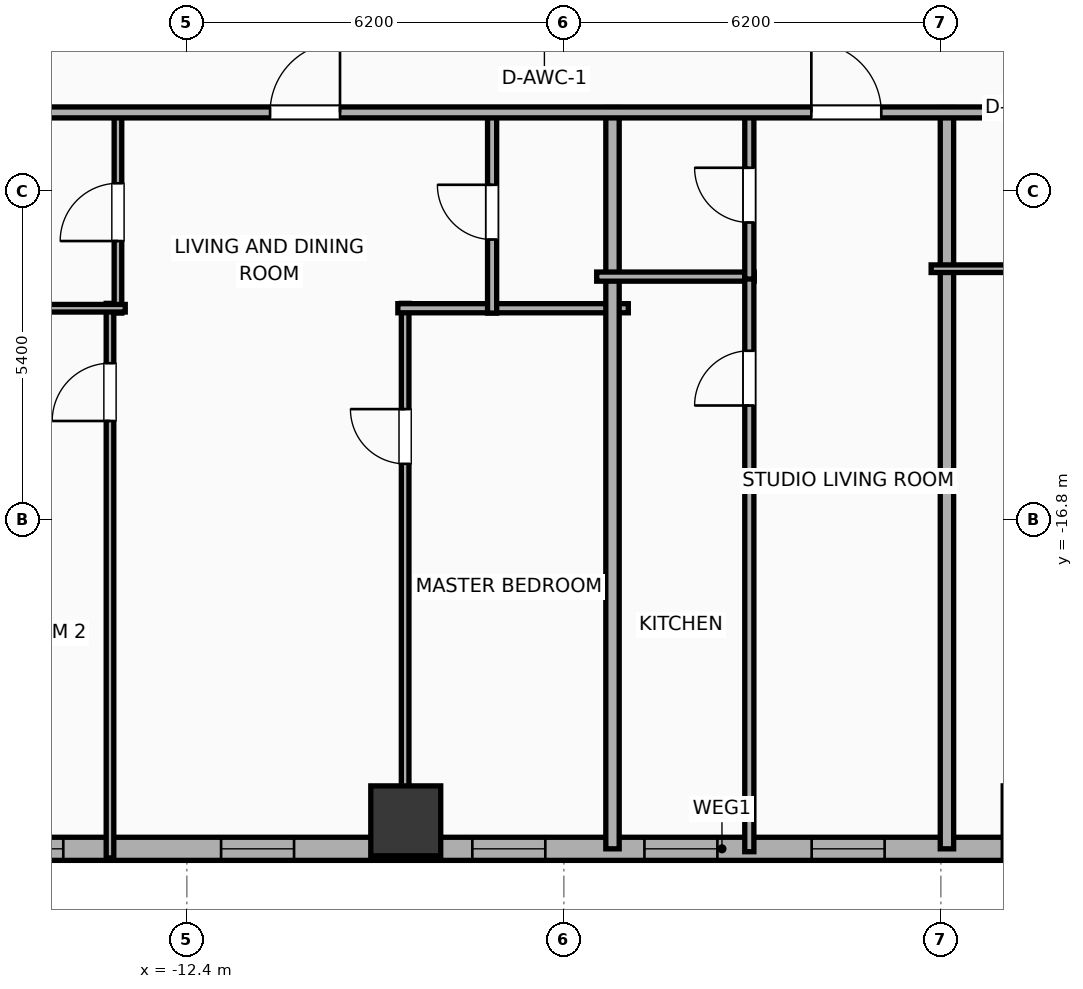
"""IFC4 building model, lengths in metres.
Left out: names, types, materials, properties, quantities, classifications, styles, units other than length and angle.
Written with IfcOpenShell. Run it as: python <this file> out.ifc"""

import sys

from ifc_helpers import new_model, si_unit, direction, frame, frame_2d, origin, origin_2d, place, context, subcontext, project, spatial, rectangle, hollow_rectangle, extrude, element, fill, save


model = new_model("IFC4")
c1 = context("Model", 3, precision=1e-05, world=origin(), true_north=direction((0.0, 1.0)))
c2 = subcontext(c1, "Body", "Model", "MODEL_VIEW")
j1 = project(units=[si_unit("LENGTHUNIT", "METRE"), si_unit("PLANEANGLEUNIT", "RADIAN")], contexts=[c1])
p1 = place(None, origin())
s1 = spatial("IfcSite", under=j1, at=p1, CompositionType="ELEMENT")
p2 = place(p1, origin())
s2 = spatial("IfcBuilding", under=s1, at=p2, CompositionType="ELEMENT")
p3 = place(p2, frame((0.0, 0.0, 45.5)))
s3 = spatial("IfcBuildingStorey", under=s2, at=p3, CompositionType="ELEMENT", Elevation=45.5)
for number, where, z_axis, x_axis in (
    (1, (-8.8, -21.75, 0.0), (0.0, 0.0, 1.0), (1.0, 0.0, 0.0)),
    (2, (1.6, -21.75, 0.0), (0.0, 0.0, 1.0), (1.0, 0.0, 0.0)),
):
    element("IfcColumn", number, at=place(p3, frame(where, z_axis=z_axis, x_axis=x_axis)), inside=s3, PredefinedType="COLUMN", context=c2, shape_type="SweptSolid", body=[
        extrude(hollow_rectangle(XDim=1.15, YDim=1.15, WallThickness=0.04, at=origin_2d()), origin(), (0.0, 0.0, 1.0), 3.9),
    ])
p4 = place(p3, frame((22.381, -22.21, 0.0), z_axis=(0.0, 0.0, 1.0), x_axis=(-1.0, 0.0, 0.0)))
e3 = element("IfcWall", 3, at=p4, inside=s3, PredefinedType="ELEMENTEDWALL", context=c2, shape_type="SweptSolid", body=[
    extrude(rectangle(XDim=51.963, YDim=0.38, at=frame_2d((25.981, 0.0))), origin(), (0.0, 0.0, 1.0), 3.65),
])
p5 = place(p4, frame((42.952, 0.0, 0.75)))
e4 = element("IfcOpeningElement", 4, at=p5, cuts=e3, PredefinedType="OPENING", context=c2, shape_type="SweptSolid", body=[
    extrude(rectangle(XDim=2.4, YDim=2.1, at=frame_2d((1.2, 1.05))), frame((0.0, 0.2, 0.0), z_axis=(0.0, -1.0, 0.0), x_axis=(1.0, 0.0, 0.0)), (0.0, 0.0, 1.0), 0.4),
])
p6 = place(p4, frame((49.847, 0.0, 0.75)))
e5 = element("IfcOpeningElement", 5, at=p6, cuts=e3, PredefinedType="OPENING", context=c2, shape_type="SweptSolid", body=[
    extrude(rectangle(XDim=1.2, YDim=2.05, at=frame_2d((0.6, 1.025))), frame((0.0, 0.2, 0.0), z_axis=(0.0, -1.0, 0.0), x_axis=(1.0, 0.0, 0.0)), (0.0, 0.0, 1.0), 0.4),
])
p7 = place(p4, frame((47.445, 0.0, 0.75)))
e6 = element("IfcOpeningElement", 6, at=p7, cuts=e3, PredefinedType="OPENING", context=c2, shape_type="SweptSolid", body=[
    extrude(rectangle(XDim=1.2, YDim=2.05, at=frame_2d((0.6, 1.025))), frame((0.0, 0.2, 0.0), z_axis=(0.0, -1.0, 0.0), x_axis=(1.0, 0.0, 0.0)), (0.0, 0.0, 1.0), 0.4),
])
p8 = place(p4, frame((39.526, 0.0, 0.75)))
e7 = element("IfcOpeningElement", 7, at=p8, cuts=e3, PredefinedType="OPENING", context=c2, shape_type="SweptSolid", body=[
    extrude(rectangle(XDim=1.2, YDim=2.05, at=frame_2d((0.6, 1.025))), frame((0.0, 0.2, 0.0), z_axis=(0.0, -1.0, 0.0), x_axis=(1.0, 0.0, 0.0)), (0.0, 0.0, 1.0), 0.4),
])
p9 = place(p4, frame((33.018, 0.0, 0.75)))
e8 = element("IfcOpeningElement", 8, at=p9, cuts=e3, PredefinedType="OPENING", context=c2, shape_type="SweptSolid", body=[
    extrude(rectangle(XDim=1.2, YDim=2.05, at=frame_2d((0.6, 1.025))), frame((0.0, 0.2, 0.0), z_axis=(0.0, -1.0, 0.0), x_axis=(1.0, 0.0, 0.0)), (0.0, 0.0, 1.0), 0.4),
])
p10 = place(p4, frame((36.813, 0.0, 0.75)))
e9 = element("IfcOpeningElement", 9, at=p10, cuts=e3, PredefinedType="OPENING", context=c2, shape_type="SweptSolid", body=[
    extrude(rectangle(XDim=1.2, YDim=2.05, at=frame_2d((0.6, 1.025))), frame((0.0, 0.2, 0.0), z_axis=(0.0, -1.0, 0.0), x_axis=(1.0, 0.0, 0.0)), (0.0, 0.0, 1.0), 0.4),
])
p11 = place(p4, frame((28.886, 0.0, 0.75)))
e10 = element("IfcOpeningElement", 10, at=p11, cuts=e3, PredefinedType="OPENING", context=c2, shape_type="SweptSolid", body=[
    extrude(rectangle(XDim=1.2, YDim=2.05, at=frame_2d((0.6, 1.025))), frame((0.0, 0.2, 0.0), z_axis=(0.0, -1.0, 0.0), x_axis=(1.0, 0.0, 0.0)), (0.0, 0.0, 1.0), 0.4),
])
p12 = place(p4, frame((23.306, 0.0, 0.75)))
e11 = element("IfcOpeningElement", 11, at=p12, cuts=e3, PredefinedType="OPENING", context=c2, shape_type="SweptSolid", body=[
    extrude(rectangle(XDim=1.2, YDim=2.05, at=frame_2d((0.6, 1.025))), frame((0.0, 0.2, 0.0), z_axis=(0.0, -1.0, 0.0), x_axis=(1.0, 0.0, 0.0)), (0.0, 0.0, 1.0), 0.4),
])
p13 = place(p4, frame((26.056, 0.0, 0.75)))
e12 = element("IfcOpeningElement", 12, at=p13, cuts=e3, PredefinedType="OPENING", context=c2, shape_type="SweptSolid", body=[
    extrude(rectangle(XDim=1.2, YDim=2.05, at=frame_2d((0.6, 1.025))), frame((0.0, 0.2, 0.0), z_axis=(0.0, -1.0, 0.0), x_axis=(1.0, 0.0, 0.0)), (0.0, 0.0, 1.0), 0.4),
])
p14 = place(p4, frame((18.811, 0.0, 0.75)))
e13 = element("IfcOpeningElement", 13, at=p14, cuts=e3, PredefinedType="OPENING", context=c2, shape_type="SweptSolid", body=[
    extrude(rectangle(XDim=1.2, YDim=2.05, at=frame_2d((0.6, 1.025))), frame((0.0, 0.2, 0.0), z_axis=(0.0, -1.0, 0.0), x_axis=(1.0, 0.0, 0.0)), (0.0, 0.0, 1.0), 0.4),
])
p15 = place(p4, frame((14.602, 0.0, 0.75)))
e14 = element("IfcOpeningElement", 14, at=p15, cuts=e3, PredefinedType="OPENING", context=c2, shape_type="SweptSolid", body=[
    extrude(rectangle(XDim=1.2, YDim=2.05, at=frame_2d((0.6, 1.025))), frame((0.0, 0.2, 0.0), z_axis=(0.0, -1.0, 0.0), x_axis=(1.0, 0.0, 0.0)), (0.0, 0.0, 1.0), 0.4),
])
p16 = place(p4, frame((11.852, 0.0, 0.75)))
e15 = element("IfcOpeningElement", 15, at=p16, cuts=e3, PredefinedType="OPENING", context=c2, shape_type="SweptSolid", body=[
    extrude(rectangle(XDim=1.2, YDim=2.05, at=frame_2d((0.6, 1.025))), frame((0.0, 0.2, 0.0), z_axis=(0.0, -1.0, 0.0), x_axis=(1.0, 0.0, 0.0)), (0.0, 0.0, 1.0), 0.4),
])
p17 = place(p4, frame((8.316, 0.0, 0.75)))
e16 = element("IfcOpeningElement", 16, at=p17, cuts=e3, PredefinedType="OPENING", context=c2, shape_type="SweptSolid", body=[
    extrude(rectangle(XDim=1.2, YDim=2.05, at=frame_2d((0.6, 1.025))), frame((0.0, 0.2, 0.0), z_axis=(0.0, -1.0, 0.0), x_axis=(1.0, 0.0, 0.0)), (0.0, 0.0, 1.0), 0.4),
])
p18 = place(p4, frame((6.286, 0.0, 0.75)))
e17 = element("IfcOpeningElement", 17, at=p18, cuts=e3, PredefinedType="OPENING", context=c2, shape_type="SweptSolid", body=[
    extrude(rectangle(XDim=1.2, YDim=2.05, at=frame_2d((0.6, 1.025))), frame((0.0, 0.2, 0.0), z_axis=(0.0, -1.0, 0.0), x_axis=(1.0, 0.0, 0.0)), (0.0, 0.0, 1.0), 0.4),
])
p19 = place(p4, frame((3.737, 0.0, 0.75)))
e18 = element("IfcOpeningElement", 18, at=p19, cuts=e3, PredefinedType="OPENING", context=c2, shape_type="SweptSolid", body=[
    extrude(rectangle(XDim=1.2, YDim=2.05, at=frame_2d((0.6, 1.025))), frame((0.0, 0.2, 0.0), z_axis=(0.0, -1.0, 0.0), x_axis=(1.0, 0.0, 0.0)), (0.0, 0.0, 1.0), 0.4),
])
p20 = place(p4, frame((1.291, 0.0, 0.75)))
e19 = element("IfcOpeningElement", 19, at=p20, cuts=e3, PredefinedType="OPENING", context=c2, shape_type="SweptSolid", body=[
    extrude(rectangle(XDim=1.2, YDim=2.05, at=frame_2d((0.6, 1.025))), frame((0.0, 0.2, 0.0), z_axis=(0.0, -1.0, 0.0), x_axis=(1.0, 0.0, 0.0)), (0.0, 0.0, 1.0), 0.4),
])
p21 = place(p3, frame((-13.664, -22.36, 0.0), z_axis=(0.0, 0.0, 1.0), x_axis=(0.0, 1.0, 0.0)))
e20 = element("IfcWall", 20, at=p21, inside=s3, PredefinedType="PARTITIONING", context=c2, shape_type="SweptSolid", body=[
    extrude(rectangle(XDim=9.12, YDim=0.125, at=frame_2d((4.56, 0.0))), origin(), (0.0, 0.0, 1.0), 3.65),
])
p22 = place(p21, frame((7.186, 0.0, 0.0)))
e21 = element("IfcOpeningElement", 21, at=p22, cuts=e20, PredefinedType="OPENING", context=c2, shape_type="SweptSolid", body=[
    extrude(rectangle(XDim=0.95, YDim=2.05, at=frame_2d((0.475, 1.025))), frame((0.0, 0.073, 0.0), z_axis=(0.0, -1.0, 0.0), x_axis=(1.0, 0.0, 0.0)), (0.0, 0.0, 1.0), 0.145),
])
p23 = place(p3, frame((-8.81, -22.36, 0.0), z_axis=(0.0, 0.0, 1.0), x_axis=(0.0, 1.0, 0.0)))
e22 = element("IfcWall", 22, at=p23, inside=s3, PredefinedType="PARTITIONING", context=c2, shape_type="SweptSolid", body=[
    extrude(rectangle(XDim=9.12, YDim=0.125, at=frame_2d((4.56, 0.0))), origin(), (0.0, 0.0, 1.0), 2.94),
])
p24 = place(p23, frame((6.481, 0.0, 0.0)))
e23 = element("IfcOpeningElement", 23, at=p24, cuts=e22, PredefinedType="OPENING", context=c2, shape_type="SweptSolid", body=[
    extrude(rectangle(XDim=0.9, YDim=2.05, at=frame_2d((0.45, 1.025))), frame((0.0, 0.073, 0.0), z_axis=(0.0, -1.0, 0.0), x_axis=(1.0, 0.0, 0.0)), (0.0, 0.0, 1.0), 0.145),
])
p25 = place(p3, frame((-8.93, -13.32, 0.0), z_axis=(0.0, 0.0, 1.0), x_axis=(1.0, 0.0, 0.0)))
e24 = element("IfcWall", 24, at=p25, inside=s3, PredefinedType="PLUMBINGWALL", context=c2, shape_type="SweptSolid", body=[
    extrude(rectangle(XDim=3.79, YDim=0.15, at=frame_2d((1.895, 0.0))), origin(), (0.0, 0.0, 1.0), 3.65),
])
p26 = place(p3, frame((-13.533, -13.4, 0.0), z_axis=(0.0, 0.0, 1.0), x_axis=(0.0, 1.0, 0.0)))
e25 = element("IfcWall", 25, at=p26, inside=s3, PredefinedType="PARTITIONING", context=c2, shape_type="SweptSolid", body=[
    extrude(rectangle(XDim=3.32, YDim=0.125, at=frame_2d((1.66, 0.0))), origin(), (0.0, 0.0, 1.0), 3.65),
])
p27 = place(p26, frame((1.185, 0.0, 0.0)))
e26 = element("IfcOpeningElement", 26, at=p27, cuts=e25, PredefinedType="OPENING", context=c2, shape_type="SweptSolid", body=[
    extrude(rectangle(XDim=0.95, YDim=2.05, at=frame_2d((0.475, 1.025))), frame((0.0, 0.073, 0.0), z_axis=(0.0, -1.0, 0.0), x_axis=(1.0, 0.0, 0.0)), (0.0, 0.0, 1.0), 0.145),
])
p28 = place(p3, frame((-16.475, -13.32, 0.0), z_axis=(0.0, 0.0, 1.0), x_axis=(1.0, 0.0, 0.0)))
e27 = element("IfcWall", 27, at=p28, inside=s3, PredefinedType="PARTITIONING", context=c2, shape_type="SweptSolid", body=[
    extrude(rectangle(XDim=3.062, YDim=0.125, at=frame_2d((1.531, 0.0))), origin(), (0.0, 0.0, 1.0), 3.65),
])
p29 = place(p3, frame((-7.38, -13.4, 0.0), z_axis=(0.0, 0.0, 1.0), x_axis=(0.0, 1.0, 0.0)))
e28 = element("IfcWall", 28, at=p29, inside=s3, PredefinedType="PLUMBINGWALL", context=c2, shape_type="SweptSolid", body=[
    extrude(rectangle(XDim=3.32, YDim=0.15, at=frame_2d((1.66, 0.0))), origin(), (0.0, 0.0, 1.0), 3.65),
])
p30 = place(p29, frame((1.21, 0.0, 0.0)))
e29 = element("IfcOpeningElement", 29, at=p30, cuts=e28, PredefinedType="OPENING", context=c2, shape_type="SweptSolid", body=[
    extrude(rectangle(XDim=0.9, YDim=2.05, at=frame_2d((0.45, 1.025))), frame((0.0, 0.085, 0.0), z_axis=(0.0, -1.0, 0.0), x_axis=(1.0, 0.0, 0.0)), (0.0, 0.0, 1.0), 0.17),
])
p31 = place(p3, frame((-5.4, -22.21, 0.0), z_axis=(0.0, 0.0, 1.0), x_axis=(0.0, 1.0, 0.0)))
e30 = element("IfcWall", 30, at=p31, inside=s3, PredefinedType="PARTITIONING", context=c2, shape_type="SweptSolid", body=[
    extrude(rectangle(XDim=12.19, YDim=0.22, at=frame_2d((6.095, 0.0))), origin(), (0.0, 0.0, 1.0), 3.65),
])
p32 = place(p3, frame((-5.66, -12.8, 0.0), z_axis=(0.0, 0.0, 1.0), x_axis=(1.0, 0.0, 0.0)))
e31 = element("IfcWall", 31, at=p32, inside=s3, PredefinedType="PLUMBINGWALL", context=c2, shape_type="SweptSolid", body=[
    extrude(rectangle(XDim=2.59, YDim=0.15, at=frame_2d((1.295, 0.0))), origin(), (0.0, 0.0, 1.0), 3.65),
])
p33 = place(p3, frame((-3.15, -22.258, 0.0), z_axis=(0.0, 0.0, 1.0), x_axis=(0.0, 1.0, 0.0)))
e32 = element("IfcWall", 32, at=p33, inside=s3, PredefinedType="PLUMBINGWALL", context=c2, shape_type="SweptSolid", body=[
    extrude(rectangle(XDim=9.498, YDim=0.15, at=frame_2d((4.749, 0.0))), origin(), (0.0, 0.0, 1.0), 3.65),
])
p34 = place(p33, frame((7.338, 0.0, 0.0)))
e33 = element("IfcOpeningElement", 33, at=p34, cuts=e32, PredefinedType="OPENING", context=c2, shape_type="SweptSolid", body=[
    extrude(rectangle(XDim=0.9, YDim=2.05, at=frame_2d((0.45, 1.025))), frame((0.0, 0.085, 0.0), z_axis=(0.0, -1.0, 0.0), x_axis=(1.0, 0.0, 0.0)), (0.0, 0.0, 1.0), 0.17),
])
p35 = place(p3, frame((-3.15, -12.84, 0.0), z_axis=(0.0, 0.0, 1.0), x_axis=(0.0, 1.0, 0.0)))
e34 = element("IfcWall", 34, at=p35, inside=s3, PredefinedType="PLUMBINGWALL", context=c2, shape_type="SweptSolid", body=[
    extrude(rectangle(XDim=2.76, YDim=0.15, at=frame_2d((1.38, 0.0))), origin(), (0.0, 0.0, 1.0), 3.65),
])
p36 = place(p35, frame((0.93, 0.0, 0.0)))
e35 = element("IfcOpeningElement", 35, at=p36, cuts=e34, PredefinedType="OPENING", context=c2, shape_type="SweptSolid", body=[
    extrude(rectangle(XDim=0.9, YDim=2.05, at=frame_2d((0.45, 1.025))), frame((0.0, 0.085, 0.0), z_axis=(0.0, -1.0, 0.0), x_axis=(1.0, 0.0, 0.0)), (0.0, 0.0, 1.0), 0.17),
])
p37 = place(p3, frame((0.1, -22.21, 0.0), z_axis=(0.0, 0.0, 1.0), x_axis=(0.0, 1.0, 0.0)))
e36 = element("IfcWall", 36, at=p37, inside=s3, PredefinedType="PARTITIONING", context=c2, shape_type="SweptSolid", body=[
    extrude(rectangle(XDim=12.19, YDim=0.22, at=frame_2d((6.095, 0.0))), origin(), (0.0, 0.0, 1.0), 3.65),
])
p38 = place(p3, frame((-0.16, -12.67, 0.0), z_axis=(0.0, 0.0, 1.0), x_axis=(1.0, 0.0, 0.0)))
e37 = element("IfcWall", 37, at=p38, inside=s3, PredefinedType="PARTITIONING", context=c2, shape_type="SweptSolid", body=[
    extrude(rectangle(XDim=2.63, YDim=0.125, at=frame_2d((1.315, 0.0))), origin(), (0.0, 0.0, 1.0), 3.65),
])
p39 = place(p3, frame((-33.41, -10.1, 0.0), z_axis=(0.0, 0.0, 1.0), x_axis=(1.0, 0.0, 0.0)))
e38 = element("IfcWall", 38, at=p39, inside=s3, PredefinedType="PARTITIONING", context=c2, shape_type="SweptSolid", body=[
    extrude(rectangle(XDim=59.62, YDim=0.18, at=frame_2d((29.81, 0.0))), origin(), (0.0, 0.0, 1.0), 3.65),
])
p40 = place(p39, frame((2.746, 0.0, 0.0)))
e39 = element("IfcOpeningElement", 39, at=p40, cuts=e38, PredefinedType="OPENING", context=c2, shape_type="SweptSolid", body=[
    extrude(rectangle(XDim=0.9, YDim=2.05, at=frame_2d((0.45, 1.025))), frame((0.0, 0.1, 0.0), z_axis=(0.0, -1.0, 0.0), x_axis=(1.0, 0.0, 0.0)), (0.0, 0.0, 1.0), 0.2),
])
p41 = place(p39, frame((11.552, 0.0, 0.0)))
e40 = element("IfcOpeningElement", 40, at=p41, cuts=e38, PredefinedType="OPENING", context=c2, shape_type="SweptSolid", body=[
    extrude(rectangle(XDim=1.15, YDim=2.05, at=frame_2d((0.575, 1.025))), frame((0.0, 0.1, 0.0), z_axis=(0.0, -1.0, 0.0), x_axis=(1.0, 0.0, 0.0)), (0.0, 0.0, 1.0), 0.2),
])
p42 = place(p39, frame((22.379, 0.0, 0.0)))
e41 = element("IfcOpeningElement", 41, at=p42, cuts=e38, PredefinedType="OPENING", context=c2, shape_type="SweptSolid", body=[
    extrude(rectangle(XDim=1.15, YDim=2.05, at=frame_2d((0.575, 1.025))), frame((0.0, 0.1, 0.0), z_axis=(0.0, -1.0, 0.0), x_axis=(1.0, 0.0, 0.0)), (0.0, 0.0, 1.0), 0.2),
])
p43 = place(p39, frame((31.28, 0.0, 0.0)))
e42 = element("IfcOpeningElement", 42, at=p43, cuts=e38, PredefinedType="OPENING", context=c2, shape_type="SweptSolid", body=[
    extrude(rectangle(XDim=1.15, YDim=2.05, at=frame_2d((0.575, 1.025))), frame((0.0, 0.1, 0.0), z_axis=(0.0, -1.0, 0.0), x_axis=(1.0, 0.0, 0.0)), (0.0, 0.0, 1.0), 0.2),
])
p44 = place(p39, frame((36.02, 0.0, 0.0)))
e43 = element("IfcOpeningElement", 43, at=p44, cuts=e38, PredefinedType="OPENING", context=c2, shape_type="SweptSolid", body=[
    extrude(rectangle(XDim=0.9, YDim=2.05, at=frame_2d((0.45, 1.025))), frame((0.0, 0.1, 0.0), z_axis=(0.0, -1.0, 0.0), x_axis=(1.0, 0.0, 0.0)), (0.0, 0.0, 1.0), 0.2),
])
p45 = place(p39, frame((40.044, 0.0, 0.0)))
e44 = element("IfcOpeningElement", 44, at=p45, cuts=e38, PredefinedType="OPENING", context=c2, shape_type="SweptSolid", body=[
    extrude(rectangle(XDim=1.15, YDim=2.05, at=frame_2d((0.575, 1.025))), frame((0.0, 0.1, 0.0), z_axis=(0.0, -1.0, 0.0), x_axis=(1.0, 0.0, 0.0)), (0.0, 0.0, 1.0), 0.2),
])
p46 = place(p39, frame((45.613, 0.0, 0.0)))
e45 = element("IfcOpeningElement", 45, at=p46, cuts=e38, PredefinedType="OPENING", context=c2, shape_type="SweptSolid", body=[
    extrude(rectangle(XDim=1.15, YDim=2.05, at=frame_2d((0.575, 1.025))), frame((0.0, 0.1, 0.0), z_axis=(0.0, -1.0, 0.0), x_axis=(1.0, 0.0, 0.0)), (0.0, 0.0, 1.0), 0.2),
])
p47 = place(p39, frame((54.174, 0.0, 0.0)))
e46 = element("IfcOpeningElement", 46, at=p47, cuts=e38, PredefinedType="OPENING", context=c2, shape_type="SweptSolid", body=[
    extrude(rectangle(XDim=1.15, YDim=2.05, at=frame_2d((0.575, 1.025))), frame((0.0, 0.1, 0.0), z_axis=(0.0, -1.0, 0.0), x_axis=(1.0, 0.0, 0.0)), (0.0, 0.0, 1.0), 0.2),
])
p48 = place(p9, origin())
e47 = element("IfcWindow", 47, at=p48, inside=s3, PartitioningType="SINGLE_PANEL", PredefinedType="WINDOW", context=c2, shape_type="SweptSolid", body=[
    extrude(rectangle(XDim=1.2, YDim=2.05, at=frame_2d((0.6, 1.025))), frame((0.0, 0.03, 0.0), z_axis=(0.0, -1.0, 0.0), x_axis=(1.0, 0.0, 0.0)), (0.0, 0.0, 1.0), 0.06),
])
fill(e8, e47)
p49 = place(p10, origin())
e48 = element("IfcWindow", 48, at=p49, inside=s3, PartitioningType="SINGLE_PANEL", PredefinedType="WINDOW", context=c2, shape_type="SweptSolid", body=[
    extrude(rectangle(XDim=1.2, YDim=2.05, at=frame_2d((0.6, 1.025))), frame((0.0, 0.03, 0.0), z_axis=(0.0, -1.0, 0.0), x_axis=(1.0, 0.0, 0.0)), (0.0, 0.0, 1.0), 0.06),
])
fill(e9, e48)
p50 = place(p11, origin())
e49 = element("IfcWindow", 49, at=p50, inside=s3, PartitioningType="SINGLE_PANEL", PredefinedType="WINDOW", context=c2, shape_type="SweptSolid", body=[
    extrude(rectangle(XDim=1.2, YDim=2.05, at=frame_2d((0.6, 1.025))), frame((0.0, 0.03, 0.0), z_axis=(0.0, -1.0, 0.0), x_axis=(1.0, 0.0, 0.0)), (0.0, 0.0, 1.0), 0.06),
])
fill(e10, e49)
p51 = place(p12, origin())
e50 = element("IfcWindow", 50, at=p51, inside=s3, PartitioningType="SINGLE_PANEL", PredefinedType="WINDOW", context=c2, shape_type="SweptSolid", body=[
    extrude(rectangle(XDim=1.2, YDim=2.05, at=frame_2d((0.6, 1.025))), frame((0.0, 0.03, 0.0), z_axis=(0.0, -1.0, 0.0), x_axis=(1.0, 0.0, 0.0)), (0.0, 0.0, 1.0), 0.06),
])
fill(e11, e50)
p52 = place(p13, origin())
e51 = element("IfcWindow", 51, at=p52, inside=s3, PartitioningType="SINGLE_PANEL", PredefinedType="WINDOW", context=c2, shape_type="SweptSolid", body=[
    extrude(rectangle(XDim=1.2, YDim=2.05, at=frame_2d((0.6, 1.025))), frame((0.0, 0.03, 0.0), z_axis=(0.0, -1.0, 0.0), x_axis=(1.0, 0.0, 0.0)), (0.0, 0.0, 1.0), 0.06),
])
fill(e12, e51)
p53 = place(p22, origin())
e52 = element("IfcDoor", 52, at=p53, inside=s3, OperationType="SINGLE_SWING_LEFT", PredefinedType="DOOR", context=c2, shape_type="SweptSolid", body=[
    extrude(rectangle(XDim=0.95, YDim=2.05, at=frame_2d((0.475, 1.025))), frame((0.0, 0.025, 0.0), z_axis=(0.0, -1.0, 0.0), x_axis=(1.0, 0.0, 0.0)), (0.0, 0.0, 1.0), 0.05),
])
fill(e21, e52)
p54 = place(p24, origin())
e53 = element("IfcDoor", 53, at=p54, inside=s3, OperationType="SINGLE_SWING_RIGHT", PredefinedType="DOOR", context=c2, shape_type="SweptSolid", body=[
    extrude(rectangle(XDim=0.9, YDim=2.05, at=frame_2d((0.45, 1.025))), frame((0.0, 0.025, 0.0), z_axis=(0.0, -1.0, 0.0), x_axis=(1.0, 0.0, 0.0)), (0.0, 0.0, 1.0), 0.05),
])
fill(e23, e53)
p55 = place(p27, origin())
e54 = element("IfcDoor", 54, at=p55, inside=s3, OperationType="SINGLE_SWING_LEFT", PredefinedType="DOOR", context=c2, shape_type="SweptSolid", body=[
    extrude(rectangle(XDim=0.95, YDim=2.05, at=frame_2d((0.475, 1.025))), frame((0.0, 0.025, 0.0), z_axis=(0.0, -1.0, 0.0), x_axis=(1.0, 0.0, 0.0)), (0.0, 0.0, 1.0), 0.05),
])
fill(e26, e54)
p56 = place(p30, origin())
e55 = element("IfcDoor", 55, at=p56, inside=s3, OperationType="SINGLE_SWING_RIGHT", PredefinedType="DOOR", context=c2, shape_type="SweptSolid", body=[
    extrude(rectangle(XDim=0.9, YDim=2.05, at=frame_2d((0.45, 1.025))), frame((0.0, 0.025, 0.0), z_axis=(0.0, -1.0, 0.0), x_axis=(1.0, 0.0, 0.0)), (0.0, 0.0, 1.0), 0.05),
])
fill(e29, e55)
p57 = place(p34, origin())
e56 = element("IfcDoor", 56, at=p57, inside=s3, OperationType="SINGLE_SWING_LEFT", PredefinedType="DOOR", context=c2, shape_type="SweptSolid", body=[
    extrude(rectangle(XDim=0.9, YDim=2.05, at=frame_2d((0.45, 1.025))), frame((0.0, 0.025, 0.0), z_axis=(0.0, -1.0, 0.0), x_axis=(1.0, 0.0, 0.0)), (0.0, 0.0, 1.0), 0.05),
])
fill(e33, e56)
p58 = place(p36, origin())
e57 = element("IfcDoor", 57, at=p58, inside=s3, OperationType="SINGLE_SWING_RIGHT", PredefinedType="DOOR", context=c2, shape_type="SweptSolid", body=[
    extrude(rectangle(XDim=0.9, YDim=2.05, at=frame_2d((0.45, 1.025))), frame((0.0, 0.025, 0.0), z_axis=(0.0, -1.0, 0.0), x_axis=(1.0, 0.0, 0.0)), (0.0, 0.0, 1.0), 0.05),
])
fill(e35, e57)
p59 = place(p42, origin())
e58 = element("IfcDoor", 58, at=p59, inside=s3, OperationType="SINGLE_SWING_RIGHT", PredefinedType="DOOR", context=c2, shape_type="SweptSolid", body=[
    extrude(rectangle(XDim=1.15, YDim=2.05, at=frame_2d((0.575, 1.025))), frame((0.0, 0.025, 0.0), z_axis=(0.0, -1.0, 0.0), x_axis=(1.0, 0.0, 0.0)), (0.0, 0.0, 1.0), 0.05),
])
fill(e41, e58)
p60 = place(p43, origin())
e59 = element("IfcDoor", 59, at=p60, inside=s3, OperationType="SINGLE_SWING_LEFT", PredefinedType="DOOR", context=c2, shape_type="SweptSolid", body=[
    extrude(rectangle(XDim=1.15, YDim=2.05, at=frame_2d((0.575, 1.025))), frame((0.0, 0.025, 0.0), z_axis=(0.0, -1.0, 0.0), x_axis=(1.0, 0.0, 0.0)), (0.0, 0.0, 1.0), 0.05),
])
fill(e42, e59)
save(model, sys.argv[1])
